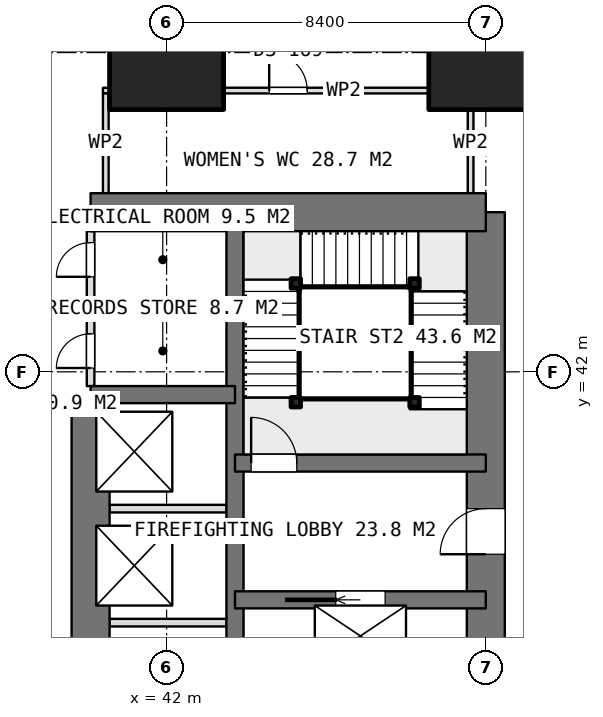
"""IFC4 building model, lengths in metres.
Left out: names, types, materials, properties, quantities, classifications, styles, units other than length and angle.
Written with IfcOpenShell. Run it as: python <this file> out.ifc"""

import sys

from ifc_helpers import new_model, si_unit, direction, frame, frame_2d, origin, origin_2d, place, context, subcontext, project, spatial, rectangle, extrude, element, fill, save


model = new_model("IFC4")
c1 = context("Model", 3, precision=1e-05, world=origin(), true_north=direction((0.0, 1.0)))
c2 = subcontext(c1, "Body", "Model", "MODEL_VIEW")
j1 = project(units=[si_unit("LENGTHUNIT", "METRE"), si_unit("PLANEANGLEUNIT", "RADIAN")], contexts=[c1])
p1 = place(None, origin())
s1 = spatial("IfcSite", under=j1, at=p1, CompositionType="ELEMENT")
p2 = place(p1, origin())
s2 = spatial("IfcBuilding", under=s1, at=p2, CompositionType="ELEMENT")
p3 = place(p2, frame((0.0, 0.0, 155.3)))
s3 = spatial("IfcBuildingStorey", under=s2, at=p3, CompositionType="ELEMENT", Elevation=155.3)
p4 = place(p3, frame((40.0, 46.2, 0.0), z_axis=(0.0, 0.0, 1.0), x_axis=(1.0, 0.0, 0.0)))
e1 = element("IfcWall", 1, at=p4, inside=s3, PredefinedType="SHEAR", context=c2, shape_type="SweptSolid", body=[
    extrude(rectangle(XDim=10.4, YDim=1.0, at=frame_2d((5.2, 0.0))), origin(), (0.0, 0.0, 1.0), 3.75),
])
p5 = place(p3, frame((50.4, 21.0, 0.0), z_axis=(0.0, 0.0, 1.0), x_axis=(0.0, 1.0, 0.0)))
e2 = element("IfcWall", 2, at=p5, inside=s3, PredefinedType="SHEAR", context=c2, shape_type="SweptSolid", body=[
    extrude(rectangle(XDim=25.2, YDim=1.0, at=frame_2d((12.6, 0.0))), origin(), (0.0, 0.0, 1.0), 3.75),
])
p6 = place(p5, frame((16.2, 0.0, 0.0)))
e3 = element("IfcOpeningElement", 3, at=p6, cuts=e2, PredefinedType="OPENING", context=c2, shape_type="SweptSolid", body=[
    extrude(rectangle(XDim=1.2, YDim=2.1, at=frame_2d((0.6, 1.05))), frame((0.0, 0.51, 0.0), z_axis=(0.0, -1.0, 0.0), x_axis=(1.0, 0.0, 0.0)), (0.0, 0.0, 1.0), 1.02),
])
p7 = place(p5, frame((10.05, 0.0, 0.0)))
e4 = element("IfcOpeningElement", 4, at=p7, cuts=e2, PredefinedType="OPENING", context=c2, shape_type="SweptSolid", body=[
    extrude(rectangle(XDim=0.9, YDim=2.1, at=frame_2d((0.45, 1.05))), frame((0.0, 0.51, 0.0), z_axis=(0.0, -1.0, 0.0), x_axis=(1.0, 0.0, 0.0)), (0.0, 0.0, 1.0), 1.02),
])
p8 = place(p5, frame((7.45, 0.0, 0.0)))
e5 = element("IfcOpeningElement", 5, at=p8, cuts=e2, PredefinedType="OPENING", context=c2, shape_type="SweptSolid", body=[
    extrude(rectangle(XDim=0.9, YDim=2.1, at=frame_2d((0.45, 1.05))), frame((0.0, 0.51, 0.0), z_axis=(0.0, -1.0, 0.0), x_axis=(1.0, 0.0, 0.0)), (0.0, 0.0, 1.0), 1.02),
])
p9 = place(p5, frame((0.7, 0.0, 0.0)))
e6 = element("IfcOpeningElement", 6, at=p9, cuts=e2, PredefinedType="OPENING", context=c2, shape_type="SweptSolid", body=[
    extrude(rectangle(XDim=1.2, YDim=2.1, at=frame_2d((0.6, 1.05))), frame((0.0, 0.51, 0.0), z_axis=(0.0, -1.0, 0.0), x_axis=(1.0, 0.0, 0.0)), (0.0, 0.0, 1.0), 1.02),
])
p10 = place(p3, frame((43.8, 21.0, 0.0), z_axis=(0.0, 0.0, 1.0), x_axis=(0.0, 1.0, 0.0)))
e7 = element("IfcWall", 7, at=p10, inside=s3, PredefinedType="SHEAR", context=c2, shape_type="SweptSolid", body=[
    extrude(rectangle(XDim=25.2, YDim=0.45, at=frame_2d((12.6, 0.0))), origin(), (0.0, 0.0, 1.0), 3.75),
])
p11 = place(p3, frame((40.0, 23.4, 0.0), z_axis=(0.0, 0.0, 1.0), x_axis=(0.0, 1.0, 0.0)))
e8 = element("IfcWall", 8, at=p11, inside=s3, PredefinedType="SHEAR", context=c2, shape_type="SweptSolid", body=[
    extrude(rectangle(XDim=18.0, YDim=1.0, at=frame_2d((9.0, 0.0))), origin(), (0.0, 0.0, 1.0), 3.75),
])
p12 = place(p11, frame((1.7, 0.0, 0.0)))
e9 = element("IfcOpeningElement", 9, at=p12, cuts=e8, PredefinedType="OPENING", context=c2, shape_type="SweptSolid", body=[
    extrude(rectangle(XDim=1.0, YDim=2.1, at=frame_2d((0.5, 1.05))), frame((0.0, 0.51, 0.0), z_axis=(0.0, -1.0, 0.0), x_axis=(1.0, 0.0, 0.0)), (0.0, 0.0, 1.0), 1.02),
])
p13 = place(p11, frame((4.75, 0.0, 0.0)))
e10 = element("IfcOpeningElement", 10, at=p13, cuts=e8, PredefinedType="OPENING", context=c2, shape_type="SweptSolid", body=[
    extrude(rectangle(XDim=0.9, YDim=2.1, at=frame_2d((0.45, 1.05))), frame((0.0, 0.51, 0.0), z_axis=(0.0, -1.0, 0.0), x_axis=(1.0, 0.0, 0.0)), (0.0, 0.0, 1.0), 1.02),
])
p14 = place(p3, frame((40.0, 41.4, 0.0), z_axis=(0.0, 0.0, 1.0), x_axis=(1.0, 0.0, 0.0)))
e11 = element("IfcWall", 11, at=p14, inside=s3, PredefinedType="SHEAR", context=c2, shape_type="SweptSolid", body=[
    extrude(rectangle(XDim=3.8, YDim=0.45, at=frame_2d((1.9, 0.0))), origin(), (0.0, 0.0, 1.0), 3.75),
])
p15 = place(p3, frame((43.8, 36.0, 0.0), z_axis=(0.0, 0.0, 1.0), x_axis=(1.0, 0.0, 0.0)))
e12 = element("IfcWall", 12, at=p15, inside=s3, PredefinedType="SHEAR", context=c2, shape_type="SweptSolid", body=[
    extrude(rectangle(XDim=6.6, YDim=0.45, at=frame_2d((3.3, 0.0))), origin(), (0.0, 0.0, 1.0), 3.75),
])
p16 = place(p15, frame((2.65, 0.0, 0.0)))
e13 = element("IfcOpeningElement", 13, at=p16, cuts=e12, PredefinedType="OPENING", context=c2, shape_type="SweptSolid", body=[
    extrude(rectangle(XDim=1.3, YDim=2.1, at=frame_2d((0.65, 1.05))), frame((0.0, 0.235, 0.0), z_axis=(0.0, -1.0, 0.0), x_axis=(1.0, 0.0, 0.0)), (0.0, 0.0, 1.0), 0.47),
])
p17 = place(p3, frame((43.8, 39.6, 0.0), z_axis=(0.0, 0.0, 1.0), x_axis=(1.0, 0.0, 0.0)))
e14 = element("IfcWall", 14, at=p17, inside=s3, PredefinedType="SHEAR", context=c2, shape_type="SweptSolid", body=[
    extrude(rectangle(XDim=6.6, YDim=0.45, at=frame_2d((3.3, 0.0))), origin(), (0.0, 0.0, 1.0), 3.75),
])
p18 = place(p17, frame((0.425, 0.0, 0.0)))
e15 = element("IfcOpeningElement", 15, at=p18, cuts=e14, PredefinedType="OPENING", context=c2, shape_type="SweptSolid", body=[
    extrude(rectangle(XDim=1.2, YDim=2.1, at=frame_2d((0.6, 1.05))), frame((0.0, 0.235, 0.0), z_axis=(0.0, -1.0, 0.0), x_axis=(1.0, 0.0, 0.0)), (0.0, 0.0, 1.0), 0.47),
])
for number, where, z_axis, x_axis in (
    (16, (42.0, 50.4, 0.0), (0.0, 0.0, 1.0), (1.0, 0.0, 0.0)),
    (17, (50.4, 50.4, 0.0), (0.0, 0.0, 1.0), (1.0, 0.0, 0.0)),
):
    element("IfcColumn", number, at=place(p3, frame(where, z_axis=z_axis, x_axis=x_axis)), inside=s3, PredefinedType="COLUMN", context=c2, shape_type="SweptSolid", body=[
        extrude(rectangle(XDim=3.0, YDim=3.0, at=origin_2d()), origin(), (0.0, 0.0, 1.0), 3.75),
    ])
for number, where, z_axis, x_axis in (
    (18, (40.5, 35.4, 0.0), (0.0, 0.0, 1.0), (1.0, 0.0, 0.0)),
    (19, (40.5, 38.4, 0.0), (0.0, 0.0, 1.0), (1.0, 0.0, 0.0)),
):
    element("IfcWall", number, at=place(p3, frame(where, z_axis=z_axis, x_axis=x_axis)), inside=s3, PredefinedType="PARTITIONING", context=c2, shape_type="SweptSolid", body=[
        extrude(rectangle(XDim=3.075, YDim=0.2, at=frame_2d((1.538, 0.0))), origin(), (0.0, 0.0, 1.0), 3.5),
    ])
p19 = place(p3, frame((40.0, 41.625, 0.0), z_axis=(0.0, 0.0, 1.0), x_axis=(0.0, 1.0, 0.0)))
e20 = element("IfcWall", 20, at=p19, inside=s3, PredefinedType="PARTITIONING", context=c2, shape_type="SweptSolid", body=[
    extrude(rectangle(XDim=4.075, YDim=0.2, at=frame_2d((2.038, 0.0))), origin(), (0.0, 0.0, 1.0), 3.5),
])
p20 = place(p19, frame((2.875, 0.0, 0.0)))
e21 = element("IfcOpeningElement", 21, at=p20, cuts=e20, PredefinedType="OPENING", context=c2, shape_type="SweptSolid", body=[
    extrude(rectangle(XDim=0.9, YDim=2.1, at=frame_2d((0.45, 1.05))), frame((0.0, 0.11, 0.0), z_axis=(0.0, -1.0, 0.0), x_axis=(1.0, 0.0, 0.0)), (0.0, 0.0, 1.0), 0.22),
])
p21 = place(p19, frame((0.475, 0.0, 0.0)))
e22 = element("IfcOpeningElement", 22, at=p21, cuts=e20, PredefinedType="OPENING", context=c2, shape_type="SweptSolid", body=[
    extrude(rectangle(XDim=0.9, YDim=2.1, at=frame_2d((0.45, 1.05))), frame((0.0, 0.11, 0.0), z_axis=(0.0, -1.0, 0.0), x_axis=(1.0, 0.0, 0.0)), (0.0, 0.0, 1.0), 0.22),
])
p22 = place(p3, frame((40.0, 43.7, 0.0), z_axis=(0.0, 0.0, 1.0), x_axis=(1.0, 0.0, 0.0)))
e23 = element("IfcWall", 23, at=p22, inside=s3, PredefinedType="PARTITIONING", context=c2, shape_type="SweptSolid", body=[
    extrude(rectangle(XDim=3.575, YDim=0.2, at=frame_2d((1.788, 0.0))), origin(), (0.0, 0.0, 1.0), 3.5),
])
p23 = place(p3, frame((40.325, 49.4, 0.0), z_axis=(0.0, 0.0, 1.0), x_axis=(1.0, 0.0, 0.0)))
e24 = element("IfcWall", 24, at=p23, inside=s3, PredefinedType="PARTITIONING", context=c2, shape_type="SweptSolid", body=[
    extrude(rectangle(XDim=9.75, YDim=0.15, at=frame_2d((4.875, 0.0))), origin(), (0.0, 0.0, 1.0), 3.5),
])
p24 = place(p23, frame((4.375, 0.0, 0.0)))
e25 = element("IfcOpeningElement", 25, at=p24, cuts=e24, PredefinedType="OPENING", context=c2, shape_type="SweptSolid", body=[
    extrude(rectangle(XDim=1.0, YDim=2.1, at=frame_2d((0.5, 1.05))), frame((0.0, 0.085, 0.0), z_axis=(0.0, -1.0, 0.0), x_axis=(1.0, 0.0, 0.0)), (0.0, 0.0, 1.0), 0.17),
])
for number, where, z_axis, x_axis in (
    (26, (40.4, 46.7, 0.0), (0.0, 0.0, 1.0), (0.0, 1.0, 0.0)),
    (27, (50.0, 46.7, 0.0), (0.0, 0.0, 1.0), (0.0, 1.0, 0.0)),
):
    element("IfcWall", number, at=place(p3, frame(where, z_axis=z_axis, x_axis=x_axis)), inside=s3, PredefinedType="PARTITIONING", context=c2, shape_type="SweptSolid", body=[
        extrude(rectangle(XDim=2.625, YDim=0.15, at=frame_2d((1.312, 0.0))), origin(), (0.0, 0.0, 1.0), 3.5),
    ])
for number, where, z_axis, x_axis in (
    (28, (45.4, 41.2, 0.0), (0.0, 0.0, 1.0), (1.0, 0.0, 0.0)),
    (29, (45.4, 44.325, 0.0), (0.0, 0.0, 1.0), (1.0, 0.0, 0.0)),
    (30, (48.525, 44.325, 0.0), (0.0, 0.0, 1.0), (1.0, 0.0, 0.0)),
    (31, (48.525, 41.2, 0.0), (0.0, 0.0, 1.0), (1.0, 0.0, 0.0)),
):
    element("IfcColumn", number, at=place(p3, frame(where, z_axis=z_axis, x_axis=x_axis)), inside=s3, PredefinedType="COLUMN", context=c2, shape_type="SweptSolid", body=[
        extrude(rectangle(XDim=0.25, YDim=0.25, at=origin_2d()), origin(), (0.0, 0.0, 1.0), 3.75),
    ])
p25 = place(p6, origin())
e32 = element("IfcDoor", 32, at=p25, inside=s3, OperationType="SINGLE_SWING_LEFT", PredefinedType="DOOR", context=c2, shape_type="SweptSolid", body=[
    extrude(rectangle(XDim=1.2, YDim=2.1, at=frame_2d((0.6, 1.05))), frame((0.0, 0.025, 0.0), z_axis=(0.0, -1.0, 0.0), x_axis=(1.0, 0.0, 0.0)), (0.0, 0.0, 1.0), 0.05),
])
fill(e3, e32)
p26 = place(p20, origin())
e33 = element("IfcDoor", 33, at=p26, inside=s3, OperationType="SINGLE_SWING_LEFT", PredefinedType="DOOR", context=c2, shape_type="SweptSolid", body=[
    extrude(rectangle(XDim=0.9, YDim=2.1, at=frame_2d((0.45, 1.05))), frame((0.0, 0.025, 0.0), z_axis=(0.0, -1.0, 0.0), x_axis=(1.0, 0.0, 0.0)), (0.0, 0.0, 1.0), 0.05),
])
fill(e21, e33)
p27 = place(p21, origin())
e34 = element("IfcDoor", 34, at=p27, inside=s3, OperationType="SINGLE_SWING_LEFT", PredefinedType="DOOR", context=c2, shape_type="SweptSolid", body=[
    extrude(rectangle(XDim=0.9, YDim=2.1, at=frame_2d((0.45, 1.05))), frame((0.0, 0.025, 0.0), z_axis=(0.0, -1.0, 0.0), x_axis=(1.0, 0.0, 0.0)), (0.0, 0.0, 1.0), 0.05),
])
fill(e22, e34)
p28 = place(p16, origin())
e35 = element("IfcDoor", 35, at=p28, inside=s3, OperationType="SLIDING_TO_LEFT", PredefinedType="USERDEFINED", context=c2, shape_type="SweptSolid", body=[
    extrude(rectangle(XDim=1.3, YDim=2.1, at=frame_2d((0.65, 1.05))), frame((0.0, 0.025, 0.0), z_axis=(0.0, -1.0, 0.0), x_axis=(1.0, 0.0, 0.0)), (0.0, 0.0, 1.0), 0.05),
])
fill(e13, e35)
p29 = place(p24, origin())
e36 = element("IfcDoor", 36, at=p29, inside=s3, OperationType="SINGLE_SWING_LEFT", PredefinedType="DOOR", context=c2, shape_type="SweptSolid", body=[
    extrude(rectangle(XDim=1.0, YDim=2.1, at=frame_2d((0.5, 1.05))), frame((0.0, 0.025, 0.0), z_axis=(0.0, -1.0, 0.0), x_axis=(1.0, 0.0, 0.0)), (0.0, 0.0, 1.0), 0.05),
])
fill(e25, e36)
p30 = place(p18, origin())
e37 = element("IfcDoor", 37, at=p30, inside=s3, OperationType="SINGLE_SWING_RIGHT", PredefinedType="DOOR", context=c2, shape_type="SweptSolid", body=[
    extrude(rectangle(XDim=1.2, YDim=2.1, at=frame_2d((0.6, 1.05))), frame((0.0, 0.025, 0.0), z_axis=(0.0, -1.0, 0.0), x_axis=(1.0, 0.0, 0.0)), (0.0, 0.0, 1.0), 0.05),
])
fill(e15, e37)
save(model, sys.argv[1])
